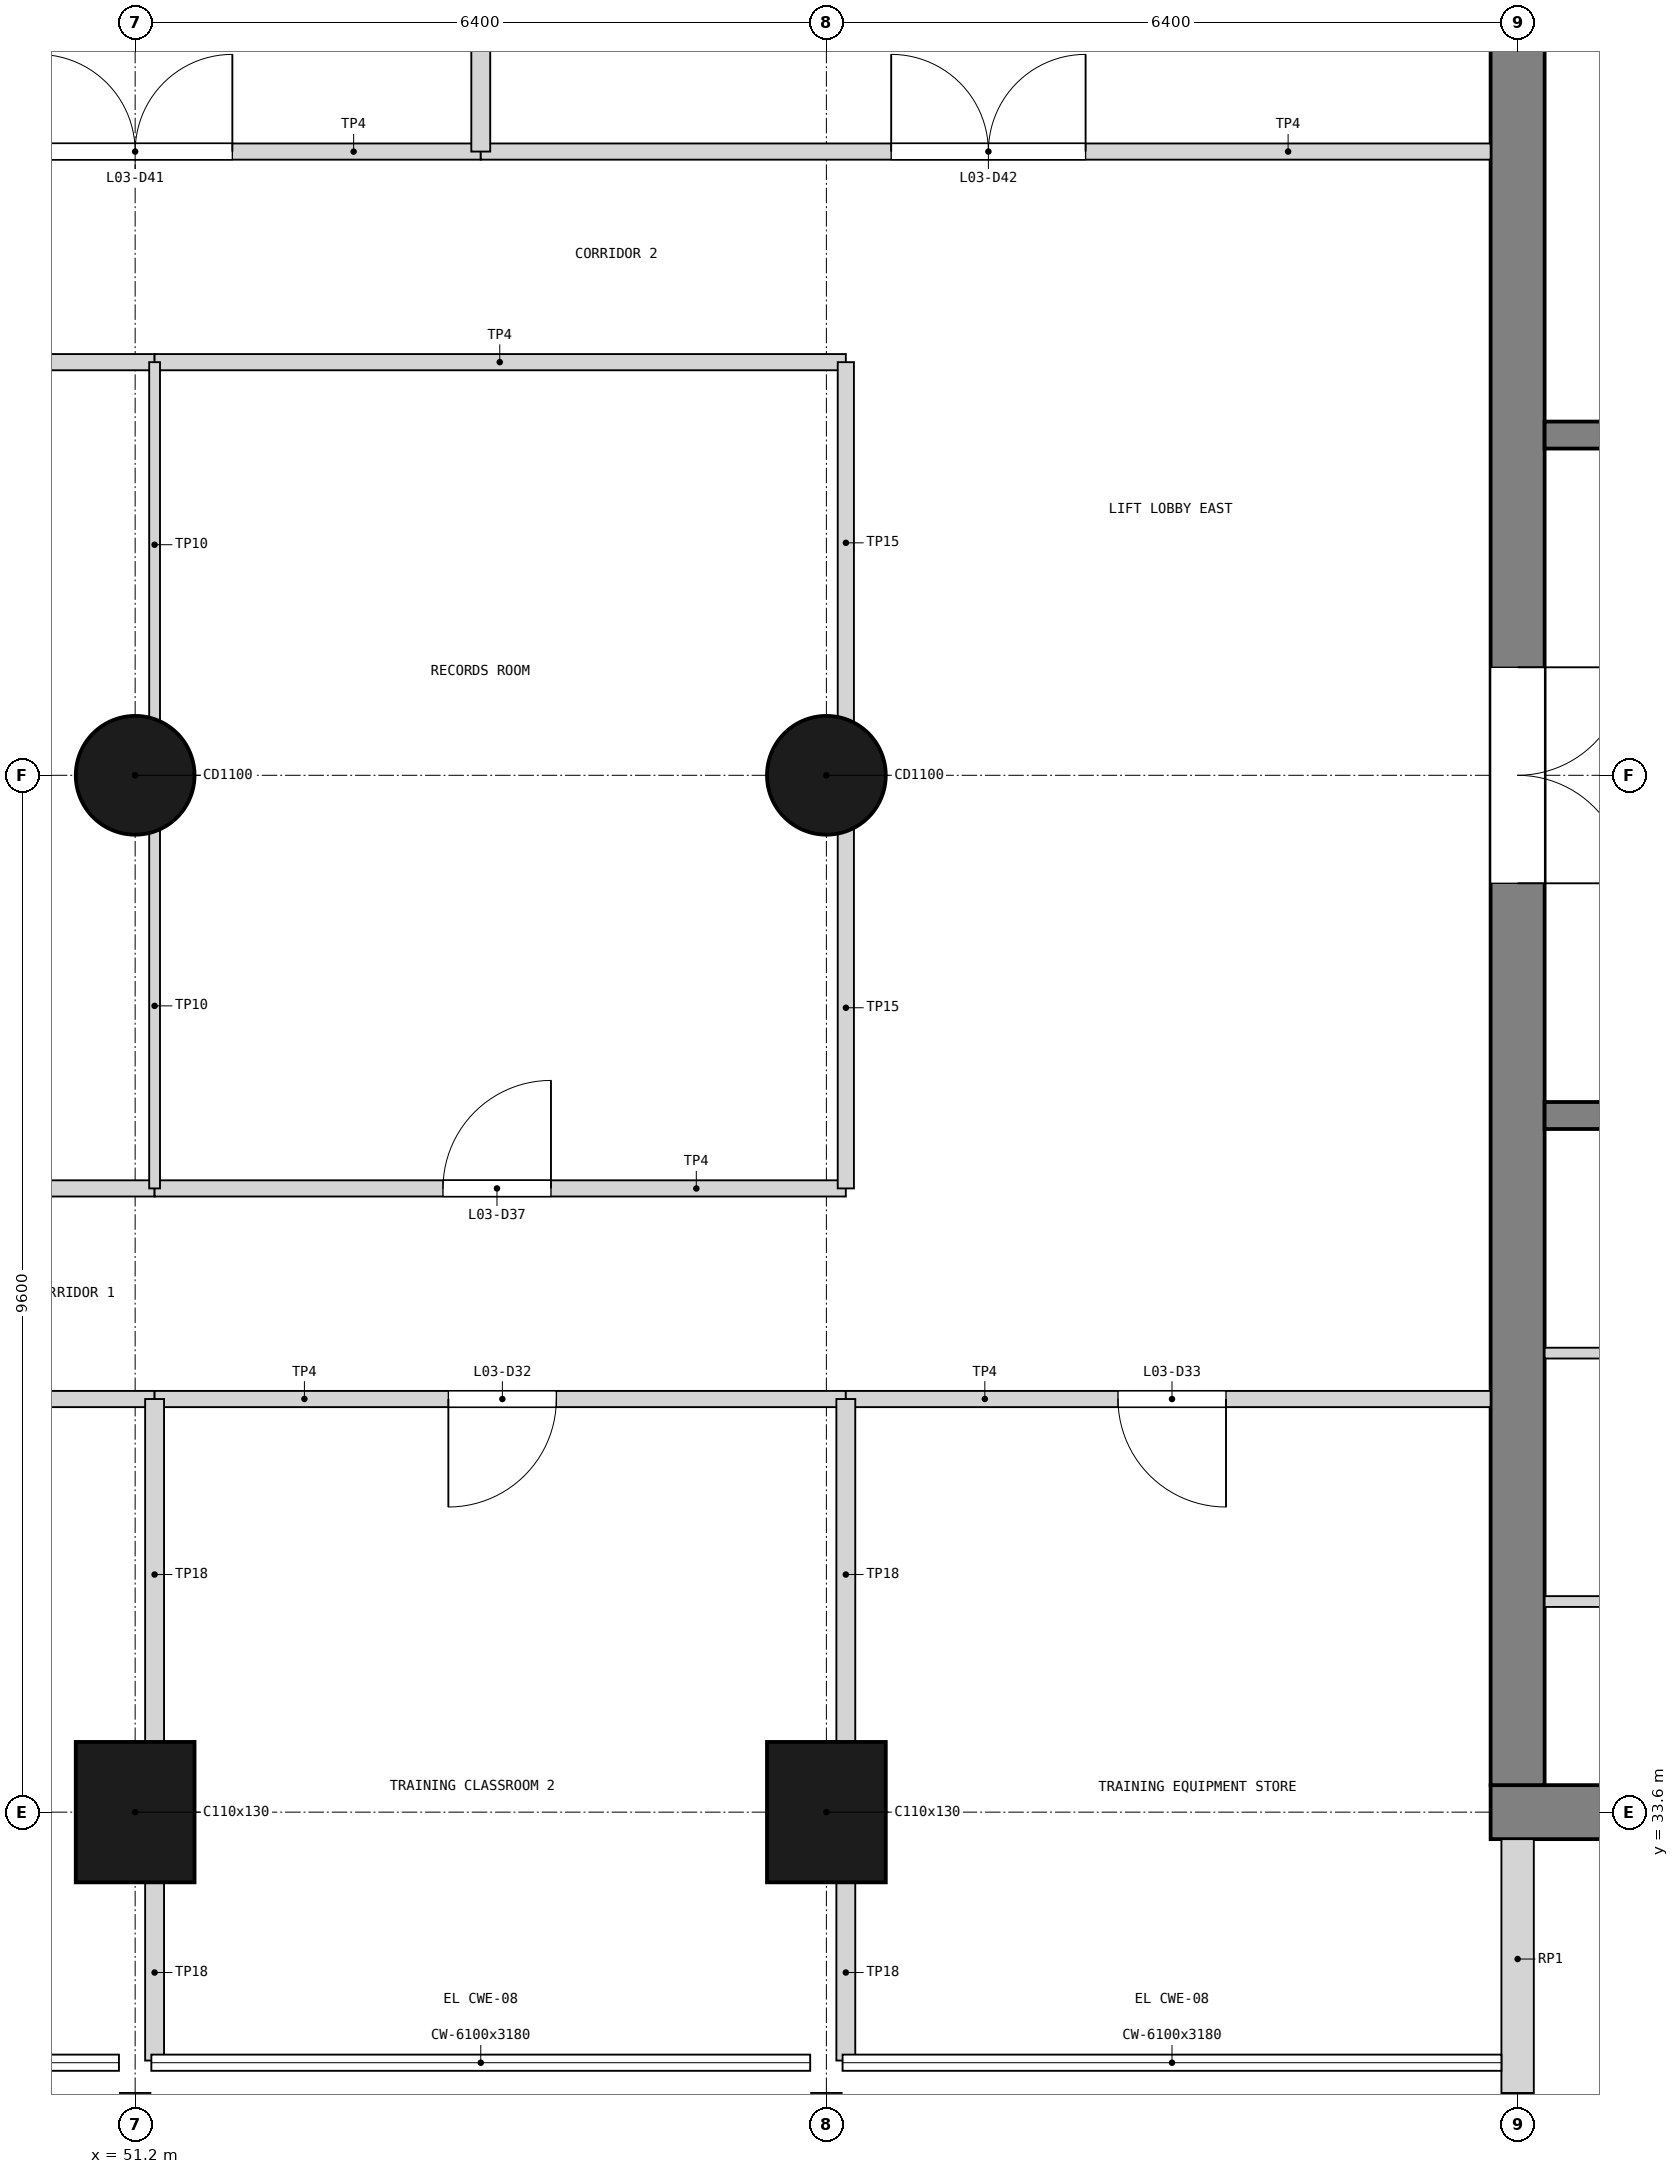
"""IFC4 building model, lengths in metres.
Left out: names, types, materials, properties, quantities, classifications, styles, units other than length and angle.
Written with IfcOpenShell. Run it as: python <this file> out.ifc"""

import sys

from ifc_helpers import new_model, si_unit, direction, frame, frame_2d, origin, origin_2d, place, context, subcontext, project, spatial, rectangle, circle, extrude, element, fill, save


model = new_model("IFC4")
c1 = context("Model", 3, precision=1e-05, world=origin(), true_north=direction((0.0, 1.0)))
c2 = subcontext(c1, "Body", "Model", "MODEL_VIEW")
j1 = project(units=[si_unit("LENGTHUNIT", "METRE"), si_unit("PLANEANGLEUNIT", "RADIAN")], contexts=[c1])
p1 = place(None, origin())
s1 = spatial("IfcSite", under=j1, at=p1, CompositionType="ELEMENT")
p2 = place(p1, origin())
s2 = spatial("IfcBuilding", under=s1, at=p2, CompositionType="ELEMENT")
p3 = place(p2, frame((0.0, 0.0, 12.9)))
s3 = spatial("IfcBuildingStorey", under=s2, at=p3, CompositionType="ELEMENT", Elevation=12.9)
p4 = place(p3, frame((63.75, 33.6, 0.0), z_axis=(0.0, 0.0, 1.0), x_axis=(1.0, 0.0, 0.0)))
e1 = element("IfcWall", 1, at=p4, inside=s3, PredefinedType="SHEAR", context=c2, shape_type="SweptSolid", body=[
    extrude(rectangle(XDim=13.3, YDim=0.5, at=frame_2d((6.65, 0.0))), origin(), (0.0, 0.0, 1.0), 4.2),
])
p5 = place(p4, frame((11.05, 0.0, 1.0)))
e2 = element("IfcOpeningElement", 2, at=p5, cuts=e1, PredefinedType="OPENING", context=c2, shape_type="SweptSolid", body=[
    extrude(rectangle(XDim=0.4, YDim=2.0, at=frame_2d((0.2, 1.0))), frame((0.0, 0.26, 0.0), z_axis=(0.0, -1.0, 0.0), x_axis=(1.0, 0.0, 0.0)), (0.0, 0.0, 1.0), 0.52),
])
p6 = place(p3, frame((64.0, 33.85, 0.0), z_axis=(0.0, 0.0, 1.0), x_axis=(0.0, 1.0, 0.0)))
e3 = element("IfcWall", 3, at=p6, inside=s3, PredefinedType="SHEAR", context=c2, shape_type="SweptSolid", body=[
    extrude(rectangle(XDim=18.7, YDim=0.5, at=frame_2d((9.35, 0.0))), origin(), (0.0, 0.0, 1.0), 4.2),
])
p7 = place(p6, frame((8.35, 0.0, 0.0)))
e4 = element("IfcOpeningElement", 4, at=p7, cuts=e3, PredefinedType="OPENING", context=c2, shape_type="SweptSolid", body=[
    extrude(rectangle(XDim=2.0, YDim=2.1, at=frame_2d((1.0, 1.05))), frame((0.0, 0.26, 0.0), z_axis=(0.0, -1.0, 0.0), x_axis=(1.0, 0.0, 0.0)), (0.0, 0.0, 1.0), 0.52),
])
p8 = place(p3, frame((51.2, 33.6, 0.0), z_axis=(0.0, 0.0, 1.0), x_axis=(1.0, 0.0, 0.0)))
e5 = element("IfcColumn", 5, at=p8, inside=s3, PredefinedType="COLUMN", context=c2, shape_type="SweptSolid", body=[
    extrude(rectangle(XDim=1.1, YDim=1.3, at=origin_2d()), origin(), (0.0, 0.0, 1.0), 4.2),
])
p9 = place(p3, frame((51.2, 43.2, 0.0), z_axis=(0.0, 0.0, 1.0), x_axis=(1.0, 0.0, 0.0)))
e6 = element("IfcColumn", 6, at=p9, inside=s3, PredefinedType="COLUMN", context=c2, shape_type="SweptSolid", body=[
    extrude(circle(Radius=0.55, at=origin_2d()), origin(), (0.0, 0.0, 1.0), 4.2),
])
p10 = place(p3, frame((57.6, 33.6, 0.0), z_axis=(0.0, 0.0, 1.0), x_axis=(1.0, 0.0, 0.0)))
e7 = element("IfcColumn", 7, at=p10, inside=s3, PredefinedType="COLUMN", context=c2, shape_type="SweptSolid", body=[
    extrude(rectangle(XDim=1.1, YDim=1.3, at=origin_2d()), origin(), (0.0, 0.0, 1.0), 4.2),
])
p11 = place(p3, frame((57.6, 43.2, 0.0), z_axis=(0.0, 0.0, 1.0), x_axis=(1.0, 0.0, 0.0)))
e8 = element("IfcColumn", 8, at=p11, inside=s3, PredefinedType="COLUMN", context=c2, shape_type="SweptSolid", body=[
    extrude(circle(Radius=0.55, at=origin_2d()), origin(), (0.0, 0.0, 1.0), 4.2),
])
p12 = place(p3, frame((64.0, 31.0, 0.0), z_axis=(0.0, 0.0, 1.0), x_axis=(0.0, 1.0, 0.0)))
e9 = element("IfcWall", 9, at=p12, inside=s3, PredefinedType="SOLIDWALL", context=c2, shape_type="SweptSolid", body=[
    extrude(rectangle(XDim=2.35, YDim=0.3, at=frame_2d((1.175, 0.0))), origin(), (0.0, 0.0, 1.0), 3.18),
])
for number, where, z_axis, x_axis in (
    (10, (69.725, 40.05, 0.0), (0.0, 0.0, 1.0), (-1.0, 0.0, 0.0)),
    (11, (69.725, 46.35, 0.0), (0.0, 0.0, 1.0), (-1.0, 0.0, 0.0)),
):
    element("IfcWall", number, at=place(p3, frame(where, z_axis=z_axis, x_axis=x_axis)), inside=s3, PredefinedType="SOLIDWALL", context=c2, shape_type="SweptSolid", body=[
        extrude(rectangle(XDim=5.475, YDim=0.25, at=frame_2d((2.738, 0.0))), origin(), (0.0, 0.0, 1.0), 3.9),
    ])
p13 = place(p3, frame((69.475, 35.55, 0.0), z_axis=(0.0, 0.0, 1.0), x_axis=(-1.0, 0.0, 0.0)))
e12 = element("IfcWall", 12, at=p13, inside=s3, PredefinedType="PARTITIONING", context=c2, shape_type="SweptSolid", body=[
    extrude(rectangle(XDim=5.225, YDim=0.1, at=frame_2d((2.613, 0.0))), origin(), (0.0, 0.0, 1.0), 3.9),
])
p14 = place(p3, frame((67.925, 37.85, 0.0), z_axis=(0.0, 0.0, 1.0), x_axis=(-1.0, 0.0, 0.0)))
e13 = element("IfcWall", 13, at=p14, inside=s3, PredefinedType="PARTITIONING", context=c2, shape_type="SweptSolid", body=[
    extrude(rectangle(XDim=3.675, YDim=0.1, at=frame_2d((1.837, 0.0))), origin(), (0.0, 0.0, 1.0), 3.9),
])
p15 = place(p3, frame((44.62, 37.425, 0.0), z_axis=(0.0, 0.0, 1.0), x_axis=(1.0, 0.0, 0.0)))
e14 = element("IfcWall", 14, at=p15, inside=s3, PredefinedType="PARTITIONING", context=c2, shape_type="SweptSolid", body=[
    extrude(rectangle(XDim=6.76, YDim=0.15, at=frame_2d((3.38, 0.0))), origin(), (0.0, 0.0, 1.0), 3.98),
])
p16 = place(p15, frame((2.88, 0.0, 0.0)))
e15 = element("IfcOpeningElement", 15, at=p16, cuts=e14, PredefinedType="OPENING", context=c2, shape_type="SweptSolid", body=[
    extrude(rectangle(XDim=1.0, YDim=2.1, at=frame_2d((0.5, 1.05))), frame((0.0, 0.085, 0.0), z_axis=(0.0, -1.0, 0.0), x_axis=(1.0, 0.0, 0.0)), (0.0, 0.0, 1.0), 0.17),
])
p17 = place(p3, frame((51.38, 37.425, 0.0), z_axis=(0.0, 0.0, 1.0), x_axis=(1.0, 0.0, 0.0)))
e16 = element("IfcWall", 16, at=p17, inside=s3, PredefinedType="PARTITIONING", context=c2, shape_type="SweptSolid", body=[
    extrude(rectangle(XDim=6.4, YDim=0.15, at=frame_2d((3.2, 0.0))), origin(), (0.0, 0.0, 1.0), 3.98),
])
p18 = place(p17, frame((2.72, 0.0, 0.0)))
e17 = element("IfcOpeningElement", 17, at=p18, cuts=e16, PredefinedType="OPENING", context=c2, shape_type="SweptSolid", body=[
    extrude(rectangle(XDim=1.0, YDim=2.1, at=frame_2d((0.5, 1.05))), frame((0.0, 0.085, 0.0), z_axis=(0.0, -1.0, 0.0), x_axis=(1.0, 0.0, 0.0)), (0.0, 0.0, 1.0), 0.17),
])
p19 = place(p3, frame((57.78, 37.425, 0.0), z_axis=(0.0, 0.0, 1.0), x_axis=(1.0, 0.0, 0.0)))
e18 = element("IfcWall", 18, at=p19, inside=s3, PredefinedType="PARTITIONING", context=c2, shape_type="SweptSolid", body=[
    extrude(rectangle(XDim=5.97, YDim=0.15, at=frame_2d((2.985, 0.0))), origin(), (0.0, 0.0, 1.0), 3.98),
])
p20 = place(p19, frame((2.52, 0.0, 0.0)))
e19 = element("IfcOpeningElement", 19, at=p20, cuts=e18, PredefinedType="OPENING", context=c2, shape_type="SweptSolid", body=[
    extrude(rectangle(XDim=1.0, YDim=2.1, at=frame_2d((0.5, 1.05))), frame((0.0, 0.085, 0.0), z_axis=(0.0, -1.0, 0.0), x_axis=(1.0, 0.0, 0.0)), (0.0, 0.0, 1.0), 0.17),
])
p21 = place(p3, frame((51.38, 31.3, 0.0), z_axis=(0.0, 0.0, 1.0), x_axis=(0.0, 1.0, 0.0)))
e20 = element("IfcWall", 20, at=p21, inside=s3, PredefinedType="PARTITIONING", context=c2, shape_type="SweptSolid", body=[
    extrude(rectangle(XDim=1.67, YDim=0.175, at=frame_2d((0.835, 0.0))), origin(), (0.0, 0.0, 1.0), 3.08),
])
p22 = place(p3, frame((51.38, 34.23, 0.0), z_axis=(0.0, 0.0, 1.0), x_axis=(0.0, 1.0, 0.0)))
e21 = element("IfcWall", 21, at=p22, inside=s3, PredefinedType="PARTITIONING", context=c2, shape_type="SweptSolid", body=[
    extrude(rectangle(XDim=3.195, YDim=0.175, at=frame_2d((1.598, 0.0))), origin(), (0.0, 0.0, 1.0), 3.08),
])
p23 = place(p3, frame((57.78, 31.3, 0.0), z_axis=(0.0, 0.0, 1.0), x_axis=(0.0, 1.0, 0.0)))
e22 = element("IfcWall", 22, at=p23, inside=s3, PredefinedType="PARTITIONING", context=c2, shape_type="SweptSolid", body=[
    extrude(rectangle(XDim=1.67, YDim=0.175, at=frame_2d((0.835, 0.0))), origin(), (0.0, 0.0, 1.0), 3.08),
])
p24 = place(p3, frame((57.78, 34.23, 0.0), z_axis=(0.0, 0.0, 1.0), x_axis=(0.0, 1.0, 0.0)))
e23 = element("IfcWall", 23, at=p24, inside=s3, PredefinedType="PARTITIONING", context=c2, shape_type="SweptSolid", body=[
    extrude(rectangle(XDim=3.195, YDim=0.175, at=frame_2d((1.598, 0.0))), origin(), (0.0, 0.0, 1.0), 3.08),
])
p25 = place(p3, frame((44.62, 39.375, 0.0), z_axis=(0.0, 0.0, 1.0), x_axis=(1.0, 0.0, 0.0)))
e24 = element("IfcWall", 24, at=p25, inside=s3, PredefinedType="PARTITIONING", context=c2, shape_type="SweptSolid", body=[
    extrude(rectangle(XDim=6.76, YDim=0.15, at=frame_2d((3.38, 0.0))), origin(), (0.0, 0.0, 1.0), 3.98),
])
p26 = place(p25, frame((2.88, 0.0, 0.0)))
e25 = element("IfcOpeningElement", 25, at=p26, cuts=e24, PredefinedType="OPENING", context=c2, shape_type="SweptSolid", body=[
    extrude(rectangle(XDim=1.0, YDim=2.1, at=frame_2d((0.5, 1.05))), frame((0.0, 0.085, 0.0), z_axis=(0.0, -1.0, 0.0), x_axis=(1.0, 0.0, 0.0)), (0.0, 0.0, 1.0), 0.17),
])
p27 = place(p3, frame((44.62, 47.025, 0.0), z_axis=(0.0, 0.0, 1.0), x_axis=(1.0, 0.0, 0.0)))
e26 = element("IfcWall", 26, at=p27, inside=s3, PredefinedType="PARTITIONING", context=c2, shape_type="SweptSolid", body=[
    extrude(rectangle(XDim=6.76, YDim=0.15, at=frame_2d((3.38, 0.0))), origin(), (0.0, 0.0, 1.0), 3.98),
])
p28 = place(p3, frame((51.38, 39.375, 0.0), z_axis=(0.0, 0.0, 1.0), x_axis=(1.0, 0.0, 0.0)))
e27 = element("IfcWall", 27, at=p28, inside=s3, PredefinedType="PARTITIONING", context=c2, shape_type="SweptSolid", body=[
    extrude(rectangle(XDim=6.4, YDim=0.15, at=frame_2d((3.2, 0.0))), origin(), (0.0, 0.0, 1.0), 3.98),
])
p29 = place(p28, frame((2.67, 0.0, 0.0)))
e28 = element("IfcOpeningElement", 28, at=p29, cuts=e27, PredefinedType="OPENING", context=c2, shape_type="SweptSolid", body=[
    extrude(rectangle(XDim=1.0, YDim=2.1, at=frame_2d((0.5, 1.05))), frame((0.0, 0.085, 0.0), z_axis=(0.0, -1.0, 0.0), x_axis=(1.0, 0.0, 0.0)), (0.0, 0.0, 1.0), 0.17),
])
p30 = place(p3, frame((51.38, 47.025, 0.0), z_axis=(0.0, 0.0, 1.0), x_axis=(1.0, 0.0, 0.0)))
e29 = element("IfcWall", 29, at=p30, inside=s3, PredefinedType="PARTITIONING", context=c2, shape_type="SweptSolid", body=[
    extrude(rectangle(XDim=6.4, YDim=0.15, at=frame_2d((3.2, 0.0))), origin(), (0.0, 0.0, 1.0), 3.98),
])
for number, where, z_axis, x_axis in (
    (30, (51.38, 39.375, 0.0), (0.0, 0.0, 1.0), (0.0, 1.0, 0.0)),
    (31, (51.38, 43.7, 0.0), (0.0, 0.0, 1.0), (0.0, 1.0, 0.0)),
):
    element("IfcWall", number, at=place(p3, frame(where, z_axis=z_axis, x_axis=x_axis)), inside=s3, PredefinedType="PARTITIONING", context=c2, shape_type="SweptSolid", body=[
        extrude(rectangle(XDim=3.325, YDim=0.1, at=frame_2d((1.663, 0.0))), origin(), (0.0, 0.0, 1.0), 3.08),
    ])
p31 = place(p3, frame((48.0, 48.975, 0.0), z_axis=(0.0, 0.0, 1.0), x_axis=(1.0, 0.0, 0.0)))
e32 = element("IfcWall", 32, at=p31, inside=s3, PredefinedType="PARTITIONING", context=c2, shape_type="SweptSolid", body=[
    extrude(rectangle(XDim=6.4, YDim=0.15, at=frame_2d((3.2, 0.0))), origin(), (0.0, 0.0, 1.0), 3.98),
])
p32 = place(p31, frame((2.3, 0.0, 0.0)))
e33 = element("IfcOpeningElement", 33, at=p32, cuts=e32, PredefinedType="OPENING", context=c2, shape_type="SweptSolid", body=[
    extrude(rectangle(XDim=1.8, YDim=2.1, at=frame_2d((0.9, 1.05))), frame((0.0, 0.085, 0.0), z_axis=(0.0, -1.0, 0.0), x_axis=(1.0, 0.0, 0.0)), (0.0, 0.0, 1.0), 0.17),
])
p33 = place(p3, frame((54.4, 48.975, 0.0), z_axis=(0.0, 0.0, 1.0), x_axis=(1.0, 0.0, 0.0)))
e34 = element("IfcWall", 34, at=p33, inside=s3, PredefinedType="PARTITIONING", context=c2, shape_type="SweptSolid", body=[
    extrude(rectangle(XDim=9.35, YDim=0.15, at=frame_2d((4.675, 0.0))), origin(), (0.0, 0.0, 1.0), 3.98),
])
p34 = place(p33, frame((3.8, 0.0, 0.0)))
e35 = element("IfcOpeningElement", 35, at=p34, cuts=e34, PredefinedType="OPENING", context=c2, shape_type="SweptSolid", body=[
    extrude(rectangle(XDim=1.8, YDim=2.1, at=frame_2d((0.9, 1.05))), frame((0.0, 0.085, 0.0), z_axis=(0.0, -1.0, 0.0), x_axis=(1.0, 0.0, 0.0)), (0.0, 0.0, 1.0), 0.17),
])
p35 = place(p3, frame((54.4, 48.975, 0.0), z_axis=(0.0, 0.0, 1.0), x_axis=(0.0, 1.0, 0.0)))
e36 = element("IfcWall", 36, at=p35, inside=s3, PredefinedType="PARTITIONING", context=c2, shape_type="SweptSolid", body=[
    extrude(rectangle(XDim=6.125, YDim=0.175, at=frame_2d((3.062, 0.0))), origin(), (0.0, 0.0, 1.0), 3.38),
])
for number, where, z_axis, x_axis in (
    (37, (57.78, 39.375, 0.0), (0.0, 0.0, 1.0), (0.0, 1.0, 0.0)),
    (38, (57.78, 43.7, 0.0), (0.0, 0.0, 1.0), (0.0, 1.0, 0.0)),
):
    element("IfcWall", number, at=place(p3, frame(where, z_axis=z_axis, x_axis=x_axis)), inside=s3, PredefinedType="PARTITIONING", context=c2, shape_type="SweptSolid", body=[
        extrude(rectangle(XDim=3.325, YDim=0.15, at=frame_2d((1.663, 0.0))), origin(), (0.0, 0.0, 1.0), 3.08),
    ])
p36 = place(p7, frame((2.0, 0.0, 0.0), z_axis=(0.0, 0.0, 1.0), x_axis=(-1.0, 0.0, 0.0)))
e39 = element("IfcDoor", 39, at=p36, inside=s3, OperationType="DOUBLE_DOOR_SINGLE_SWING", PredefinedType="DOOR", context=c2, shape_type="SweptSolid", body=[
    extrude(rectangle(XDim=2.0, YDim=2.1, at=frame_2d((1.0, 1.05))), frame((0.0, 0.025, 0.0), z_axis=(0.0, -1.0, 0.0), x_axis=(1.0, 0.0, 0.0)), (0.0, 0.0, 1.0), 0.05),
])
fill(e4, e39)
p37 = place(p18, frame((1.0, 0.0, 0.0), z_axis=(0.0, 0.0, 1.0), x_axis=(-1.0, 0.0, 0.0)))
e40 = element("IfcDoor", 40, at=p37, inside=s3, OperationType="SINGLE_SWING_RIGHT", PredefinedType="DOOR", context=c2, shape_type="SweptSolid", body=[
    extrude(rectangle(XDim=1.0, YDim=2.1, at=frame_2d((0.5, 1.05))), frame((0.0, 0.025, 0.0), z_axis=(0.0, -1.0, 0.0), x_axis=(1.0, 0.0, 0.0)), (0.0, 0.0, 1.0), 0.05),
])
fill(e17, e40)
p38 = place(p20, frame((1.0, 0.0, 0.0), z_axis=(0.0, 0.0, 1.0), x_axis=(-1.0, 0.0, 0.0)))
e41 = element("IfcDoor", 41, at=p38, inside=s3, OperationType="SINGLE_SWING_LEFT", PredefinedType="DOOR", context=c2, shape_type="SweptSolid", body=[
    extrude(rectangle(XDim=1.0, YDim=2.1, at=frame_2d((0.5, 1.05))), frame((0.0, 0.025, 0.0), z_axis=(0.0, -1.0, 0.0), x_axis=(1.0, 0.0, 0.0)), (0.0, 0.0, 1.0), 0.05),
])
fill(e19, e41)
p39 = place(p29, origin())
e42 = element("IfcDoor", 42, at=p39, inside=s3, OperationType="SINGLE_SWING_RIGHT", PredefinedType="DOOR", context=c2, shape_type="SweptSolid", body=[
    extrude(rectangle(XDim=1.0, YDim=2.1, at=frame_2d((0.5, 1.05))), frame((0.0, 0.025, 0.0), z_axis=(0.0, -1.0, 0.0), x_axis=(1.0, 0.0, 0.0)), (0.0, 0.0, 1.0), 0.05),
])
fill(e28, e42)
p40 = place(p32, origin())
e43 = element("IfcDoor", 43, at=p40, inside=s3, OperationType="DOUBLE_DOOR_SINGLE_SWING", PredefinedType="DOOR", context=c2, shape_type="SweptSolid", body=[
    extrude(rectangle(XDim=1.8, YDim=2.1, at=frame_2d((0.9, 1.05))), frame((0.0, 0.025, 0.0), z_axis=(0.0, -1.0, 0.0), x_axis=(1.0, 0.0, 0.0)), (0.0, 0.0, 1.0), 0.05),
])
fill(e33, e43)
p41 = place(p34, origin())
e44 = element("IfcDoor", 44, at=p41, inside=s3, OperationType="DOUBLE_DOOR_SINGLE_SWING", PredefinedType="DOOR", context=c2, shape_type="SweptSolid", body=[
    extrude(rectangle(XDim=1.8, YDim=2.1, at=frame_2d((0.9, 1.05))), frame((0.0, 0.025, 0.0), z_axis=(0.0, -1.0, 0.0), x_axis=(1.0, 0.0, 0.0)), (0.0, 0.0, 1.0), 0.05),
])
fill(e35, e44)
save(model, sys.argv[1])
